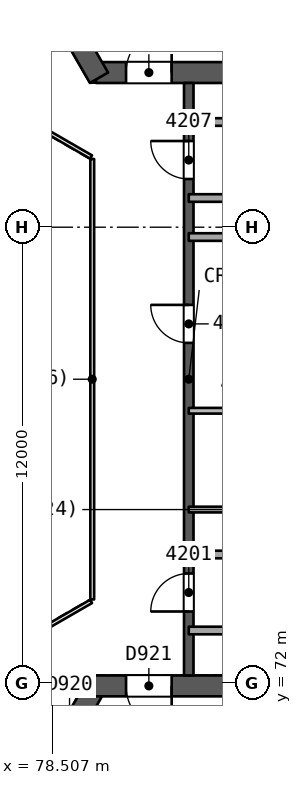
"""IFC4 building model, lengths in metres.
Left out: names, types, materials, properties, quantities, classifications, styles, units other than length and angle.
Written with IfcOpenShell. Run it as: python <this file> out.ifc"""

import sys

from ifc_helpers import new_model, si_unit, direction, frame, frame_2d, origin, place, context, subcontext, project, spatial, rectangle, extrude, element, fill, save


model = new_model("IFC4")
c1 = context("Model", 3, precision=1e-05, world=origin(), true_north=direction((0.0, 1.0)))
c2 = subcontext(c1, "Body", "Model", "MODEL_VIEW")
j1 = project(units=[si_unit("LENGTHUNIT", "METRE"), si_unit("PLANEANGLEUNIT", "RADIAN")], contexts=[c1])
p1 = place(None, origin())
s1 = spatial("IfcSite", under=j1, at=p1, CompositionType="ELEMENT")
p2 = place(p1, origin())
s2 = spatial("IfcBuilding", under=s1, at=p2, CompositionType="ELEMENT")
p3 = place(p2, frame((0.0, 0.0, 174.8)))
s3 = spatial("IfcBuildingStorey", under=s2, at=p3, CompositionType="ELEMENT", Elevation=174.8)
p4 = place(p3, frame((79.659, 88.069, 0.0), z_axis=(0.0, 0.0, 1.0), x_axis=(1.0, 0.0, 0.0)))
e1 = element("IfcWall", 1, at=p4, inside=s3, PredefinedType="SHEAR", context=c2, shape_type="SweptSolid", body=[
    extrude(rectangle(XDim=10.221, YDim=0.55, at=frame_2d((5.111, 0.0))), origin(), (0.0, 0.0, 1.0), 3.7),
])
p5 = place(p4, frame((0.791, 0.0, 0.0)))
e2 = element("IfcOpeningElement", 2, at=p5, cuts=e1, PredefinedType="OPENING", context=c2, shape_type="SweptSolid", body=[
    extrude(rectangle(XDim=1.2, YDim=2.1, at=frame_2d((0.6, 1.05))), frame((0.0, 0.286, 0.0), z_axis=(0.0, -1.0, 0.0), x_axis=(1.0, 0.0, 0.0)), (0.0, 0.0, 1.0), 0.571),
])
p6 = place(p3, frame((74.686, 96.683, 0.0), z_axis=(0.0, 0.0, 1.0), x_axis=(0.499997818338, -0.866026663364, 0.0)))
e3 = element("IfcWall", 3, at=p6, inside=s3, PredefinedType="SHEAR", context=c2, shape_type="SweptSolid", body=[
    extrude(rectangle(XDim=10.105, YDim=0.55, at=frame_2d((5.052, 0.0))), origin(), (0.0, 0.0, 1.0), 3.7),
])
p7 = place(p6, frame((7.955, 0.0, 0.0)))
e4 = element("IfcOpeningElement", 4, at=p7, cuts=e3, PredefinedType="OPENING", context=c2, shape_type="SweptSolid", body=[
    extrude(rectangle(XDim=1.2, YDim=2.1, at=frame_2d((0.6, 1.05))), frame((0.0, 0.286, 0.0), z_axis=(0.0, -1.0, 0.0), x_axis=(1.0, 0.0, 0.0)), (0.0, 0.0, 1.0), 0.571),
])
p8 = place(p3, frame((79.659, 71.931, 0.0), z_axis=(0.0, 0.0, 1.0), x_axis=(-0.500000202252, -0.866025287014, 0.0)))
e5 = element("IfcWall", 5, at=p8, inside=s3, PredefinedType="SHEAR", context=c2, shape_type="SweptSolid", body=[
    extrude(rectangle(XDim=10.221, YDim=0.55, at=frame_2d((5.111, 0.0))), origin(), (0.0, 0.0, 1.0), 3.7),
])
p9 = place(p8, frame((0.791, 0.0, 0.0)))
e6 = element("IfcOpeningElement", 6, at=p9, cuts=e5, PredefinedType="OPENING", context=c2, shape_type="SweptSolid", body=[
    extrude(rectangle(XDim=1.2, YDim=2.1, at=frame_2d((0.6, 1.05))), frame((0.0, 0.286, 0.0), z_axis=(0.0, -1.0, 0.0), x_axis=(1.0, 0.0, 0.0)), (0.0, 0.0, 1.0), 0.571),
])
p10 = place(p3, frame((89.605, 71.931, 0.0), z_axis=(0.0, 0.0, 1.0), x_axis=(-1.0, 0.0, 0.0)))
e7 = element("IfcWall", 7, at=p10, inside=s3, PredefinedType="SHEAR", context=c2, shape_type="SweptSolid", body=[
    extrude(rectangle(XDim=10.105, YDim=0.55, at=frame_2d((5.052, 0.0))), origin(), (0.0, 0.0, 1.0), 3.7),
])
p11 = place(p10, frame((7.955, 0.0, 0.0)))
e8 = element("IfcOpeningElement", 8, at=p11, cuts=e7, PredefinedType="OPENING", context=c2, shape_type="SweptSolid", body=[
    extrude(rectangle(XDim=1.2, YDim=2.1, at=frame_2d((0.6, 1.05))), frame((0.0, 0.286, 0.0), z_axis=(0.0, -1.0, 0.0), x_axis=(1.0, 0.0, 0.0)), (0.0, 0.0, 1.0), 0.571),
])
p12 = place(p3, frame((82.1, 72.206, 0.0), z_axis=(0.0, 0.0, 1.0), x_axis=(0.0, 1.0, 0.0)))
e9 = element("IfcWall", 9, at=p12, inside=s3, PredefinedType="SHEAR", context=c2, shape_type="SweptSolid", body=[
    extrude(rectangle(XDim=15.588, YDim=0.25, at=frame_2d((7.794, 0.0))), origin(), (0.0, 0.0, 1.0), 3.25),
])
p13 = place(p12, frame((1.682, 0.0, 0.0)))
e10 = element("IfcOpeningElement", 10, at=p13, cuts=e9, PredefinedType="OPENING", context=c2, shape_type="SweptSolid", body=[
    extrude(rectangle(XDim=1.0, YDim=2.1, at=frame_2d((0.5, 1.05))), frame((0.0, 0.135, 0.0), z_axis=(0.0, -1.0, 0.0), x_axis=(1.0, 0.0, 0.0)), (0.0, 0.0, 1.0), 0.271),
])
p14 = place(p12, frame((8.75, 0.0, 0.0)))
e11 = element("IfcOpeningElement", 11, at=p14, cuts=e9, PredefinedType="OPENING", context=c2, shape_type="SweptSolid", body=[
    extrude(rectangle(XDim=1.0, YDim=2.1, at=frame_2d((0.5, 1.05))), frame((0.0, 0.135, 0.0), z_axis=(0.0, -1.0, 0.0), x_axis=(1.0, 0.0, 0.0)), (0.0, 0.0, 1.0), 0.271),
])
p15 = place(p12, frame((13.062, 0.0, 0.0)))
e12 = element("IfcOpeningElement", 12, at=p15, cuts=e9, PredefinedType="OPENING", context=c2, shape_type="SweptSolid", body=[
    extrude(rectangle(XDim=1.0, YDim=2.1, at=frame_2d((0.5, 1.05))), frame((0.0, 0.135, 0.0), z_axis=(0.0, -1.0, 0.0), x_axis=(1.0, 0.0, 0.0)), (0.0, 0.0, 1.0), 0.271),
])
p16 = place(p3, frame((82.1, 75.388, 0.0), z_axis=(0.0, 0.0, 1.0), x_axis=(1.0, 0.0, 0.0)))
e13 = element("IfcWall", 13, at=p16, inside=s3, PredefinedType="PARTITIONING", context=c2, shape_type="SweptSolid", body=[
    extrude(rectangle(XDim=9.0, YDim=0.2, at=frame_2d((4.5, 0.0))), origin(), (0.0, 0.0, 1.0), 3.25),
])
p17 = place(p16, frame((4.05, 0.0, 0.0)))
e14 = element("IfcOpeningElement", 14, at=p17, cuts=e13, PredefinedType="OPENING", context=c2, shape_type="SweptSolid", body=[
    extrude(rectangle(XDim=0.9, YDim=2.1, at=frame_2d((0.45, 1.05))), frame((0.0, 0.11, 0.0), z_axis=(0.0, -1.0, 0.0), x_axis=(1.0, 0.0, 0.0)), (0.0, 0.0, 1.0), 0.221),
])
p18 = place(p3, frame((91.1, 73.388, 0.0), z_axis=(0.0, 0.0, 1.0), x_axis=(-1.0, 0.0, 0.0)))
e15 = element("IfcWall", 15, at=p18, inside=s3, PredefinedType="PARTITIONING", context=c2, shape_type="SweptSolid", body=[
    extrude(rectangle(XDim=9.0, YDim=0.2, at=frame_2d((4.5, 0.0))), origin(), (0.0, 0.0, 1.0), 3.25),
])
p19 = place(p3, frame((85.0, 76.571, 0.0), z_axis=(0.0, 0.0, 1.0), x_axis=(-1.0, 0.0, 0.0)))
e16 = element("IfcWall", 16, at=p19, inside=s3, PredefinedType="PARTITIONING", context=c2, shape_type="SweptSolid", body=[
    extrude(rectangle(XDim=2.9, YDim=0.15, at=frame_2d((1.45, 0.0))), origin(), (0.0, 0.0, 1.0), 3.25),
])
p20 = place(p3, frame((82.1, 79.171, 0.0), z_axis=(0.0, 0.0, 1.0), x_axis=(1.0, 0.0, 0.0)))
e17 = element("IfcWall", 17, at=p20, inside=s3, PredefinedType="PARTITIONING", context=c2, shape_type="SweptSolid", body=[
    extrude(rectangle(XDim=2.9, YDim=0.15, at=frame_2d((1.45, 0.0))), origin(), (0.0, 0.0, 1.0), 3.25),
])
p21 = place(p20, frame((1.05, 0.0, 0.0)))
e18 = element("IfcOpeningElement", 18, at=p21, cuts=e17, PredefinedType="OPENING", context=c2, shape_type="SweptSolid", body=[
    extrude(rectangle(XDim=0.8, YDim=2.1, at=frame_2d((0.4, 1.05))), frame((0.0, 0.085, 0.0), z_axis=(0.0, -1.0, 0.0), x_axis=(1.0, 0.0, 0.0)), (0.0, 0.0, 1.0), 0.171),
])
p22 = place(p3, frame((93.428, 83.741, 0.0), z_axis=(0.0, 0.0, 1.0), x_axis=(-1.0, 0.0, 0.0)))
e19 = element("IfcWall", 19, at=p22, inside=s3, PredefinedType="PARTITIONING", context=c2, shape_type="SweptSolid", body=[
    extrude(rectangle(XDim=11.328, YDim=0.2, at=frame_2d((5.664, 0.0))), origin(), (0.0, 0.0, 1.0), 3.25),
])
for number, where, z_axis, x_axis in (
    (20, (82.1, 86.768, 0.0), (0.0, 0.0, 1.0), (1.0, 0.0, 0.0)),
    (21, (91.1, 84.768, 0.0), (0.0, 0.0, 1.0), (-1.0, 0.0, 0.0)),
):
    element("IfcWall", number, at=place(p3, frame(where, z_axis=z_axis, x_axis=x_axis)), inside=s3, PredefinedType="PARTITIONING", context=c2, shape_type="SweptSolid", body=[
        extrude(rectangle(XDim=9.0, YDim=0.2, at=frame_2d((4.5, 0.0))), origin(), (0.0, 0.0, 1.0), 3.25),
    ])
p23 = place(p3, frame((42.58, 82.733, 0.0), z_axis=(0.0, 0.0, 1.0), x_axis=(0.866025382531, 0.500000036812, 0.0)))
e22 = element("IfcWall", 22, at=p23, inside=s3, PredefinedType="SOLIDWALL", context=c2, shape_type="SweptSolid", body=[
    extrude(rectangle(XDim=53.42, YDim=0.3, at=frame_2d((26.71, 0.0))), origin(), (0.0, 0.0, 1.0), 3.25),
])
p24 = place(p23, frame((30.499, 0.0, 0.0)))
e23 = element("IfcOpeningElement", 23, at=p24, cuts=e22, PredefinedType="OPENING", context=c2, shape_type="SweptSolid", body=[
    extrude(rectangle(XDim=2.4, YDim=2.4, at=frame_2d((1.2, 1.2))), frame((0.0, 0.161, 0.0), z_axis=(0.0, -1.0, 0.0), x_axis=(1.0, 0.0, 0.0)), (0.0, 0.0, 1.0), 0.321),
])
p25 = place(p23, frame((41.52, 0.0, 0.0)))
e24 = element("IfcOpeningElement", 24, at=p25, cuts=e22, PredefinedType="OPENING", context=c2, shape_type="SweptSolid", body=[
    extrude(rectangle(XDim=2.4, YDim=2.4, at=frame_2d((1.2, 1.2))), frame((0.0, 0.161, 0.0), z_axis=(0.0, -1.0, 0.0), x_axis=(1.0, 0.0, 0.0)), (0.0, 0.0, 1.0), 0.321),
])
p26 = place(p23, frame((19.742, 0.0, 0.0)))
e25 = element("IfcOpeningElement", 25, at=p26, cuts=e22, PredefinedType="OPENING", context=c2, shape_type="SweptSolid", body=[
    extrude(rectangle(XDim=2.4, YDim=2.4, at=frame_2d((1.2, 1.2))), frame((0.0, 0.161, 0.0), z_axis=(0.0, -1.0, 0.0), x_axis=(1.0, 0.0, 0.0)), (0.0, 0.0, 1.0), 0.321),
])
p27 = place(p23, frame((9.507, 0.0, 0.0)))
e26 = element("IfcOpeningElement", 26, at=p27, cuts=e22, PredefinedType="OPENING", context=c2, shape_type="SweptSolid", body=[
    extrude(rectangle(XDim=2.4, YDim=2.4, at=frame_2d((1.2, 1.2))), frame((0.0, 0.161, 0.0), z_axis=(0.0, -1.0, 0.0), x_axis=(1.0, 0.0, 0.0)), (0.0, 0.0, 1.0), 0.321),
])
p28 = place(p23, frame((26.512, 0.0, 0.9)))
e27 = element("IfcOpeningElement", 27, at=p28, cuts=e22, PredefinedType="OPENING", context=c2, shape_type="SweptSolid", body=[
    extrude(rectangle(XDim=1.8, YDim=1.5, at=frame_2d((0.9, 0.75))), frame((0.0, 0.161, 0.0), z_axis=(0.0, -1.0, 0.0), x_axis=(1.0, 0.0, 0.0)), (0.0, 0.0, 1.0), 0.321),
])
p29 = place(p23, frame((23.55, 0.0, 0.9)))
e28 = element("IfcOpeningElement", 28, at=p29, cuts=e22, PredefinedType="OPENING", context=c2, shape_type="SweptSolid", body=[
    extrude(rectangle(XDim=1.8, YDim=1.5, at=frame_2d((0.9, 0.75))), frame((0.0, 0.161, 0.0), z_axis=(0.0, -1.0, 0.0), x_axis=(1.0, 0.0, 0.0)), (0.0, 0.0, 1.0), 0.321),
])
p30 = place(p3, frame((88.844, 50.557, 0.0), z_axis=(0.0, 0.0, 1.0), x_axis=(-0.866025382531, 0.500000036812, 0.0)))
e29 = element("IfcWall", 29, at=p30, inside=s3, PredefinedType="SOLIDWALL", context=c2, shape_type="SweptSolid", body=[
    extrude(rectangle(XDim=53.42, YDim=0.3, at=frame_2d((26.71, 0.0))), origin(), (0.0, 0.0, 1.0), 3.25),
])
p31 = place(p30, frame((31.122, 0.0, 0.0)))
e30 = element("IfcOpeningElement", 30, at=p31, cuts=e29, PredefinedType="OPENING", context=c2, shape_type="SweptSolid", body=[
    extrude(rectangle(XDim=2.4, YDim=2.4, at=frame_2d((1.2, 1.2))), frame((0.0, 0.161, 0.0), z_axis=(0.0, -1.0, 0.0), x_axis=(1.0, 0.0, 0.0)), (0.0, 0.0, 1.0), 0.321),
])
p32 = place(p30, frame((41.52, 0.0, 0.0)))
e31 = element("IfcOpeningElement", 31, at=p32, cuts=e29, PredefinedType="OPENING", context=c2, shape_type="SweptSolid", body=[
    extrude(rectangle(XDim=2.4, YDim=2.4, at=frame_2d((1.2, 1.2))), frame((0.0, 0.161, 0.0), z_axis=(0.0, -1.0, 0.0), x_axis=(1.0, 0.0, 0.0)), (0.0, 0.0, 1.0), 0.321),
])
p33 = place(p30, frame((20.834, 0.0, 0.0)))
e32 = element("IfcOpeningElement", 32, at=p33, cuts=e29, PredefinedType="OPENING", context=c2, shape_type="SweptSolid", body=[
    extrude(rectangle(XDim=2.4, YDim=2.4, at=frame_2d((1.2, 1.2))), frame((0.0, 0.161, 0.0), z_axis=(0.0, -1.0, 0.0), x_axis=(1.0, 0.0, 0.0)), (0.0, 0.0, 1.0), 0.321),
])
p34 = place(p30, frame((9.507, 0.0, 0.0)))
e33 = element("IfcOpeningElement", 33, at=p34, cuts=e29, PredefinedType="OPENING", context=c2, shape_type="SweptSolid", body=[
    extrude(rectangle(XDim=2.4, YDim=2.4, at=frame_2d((1.2, 1.2))), frame((0.0, 0.161, 0.0), z_axis=(0.0, -1.0, 0.0), x_axis=(1.0, 0.0, 0.0)), (0.0, 0.0, 1.0), 0.321),
])
p35 = place(p30, frame((26.446, 0.0, 0.0)))
e34 = element("IfcOpeningElement", 34, at=p35, cuts=e29, PredefinedType="OPENING", context=c2, shape_type="SweptSolid", body=[
    extrude(rectangle(XDim=2.4, YDim=2.4, at=frame_2d((1.2, 1.2))), frame((0.0, 0.161, 0.0), z_axis=(0.0, -1.0, 0.0), x_axis=(1.0, 0.0, 0.0)), (0.0, 0.0, 1.0), 0.321),
])
p36 = place(p3, frame((79.56, 74.206, 0.0), z_axis=(0.0, 0.0, 1.0), x_axis=(0.0, 1.0, 0.0)))
e35 = element("IfcWall", 35, at=p36, inside=s3, PredefinedType="PARTITIONING", context=c2, shape_type="SweptSolid", body=[
    extrude(rectangle(XDim=11.588, YDim=0.1, at=frame_2d((5.794, 0.0))), origin(), (0.0, 0.0, 1.0), 3.25),
])
for number, where, z_axis, x_axis in (
    (36, (79.53, 85.846, 0.0), (0.0, 0.0, 1.0), (-0.866, 0.5, 0.0)),
    (37, (77.798, 73.154, 0.0), (0.0, 0.0, 1.0), (0.866, 0.5, 0.0)),
):
    element("IfcWall", number, at=place(p3, frame(where, z_axis=z_axis, x_axis=x_axis)), inside=s3, PredefinedType="PARTITIONING", context=c2, shape_type="SweptSolid", body=[
        extrude(rectangle(XDim=2.0, YDim=0.1, at=frame_2d((1.0, 0.0))), origin(), (0.0, 0.0, 1.0), 3.25),
    ])
p37 = place(p13, origin())
e38 = element("IfcDoor", 38, at=p37, inside=s3, OperationType="SINGLE_SWING_LEFT", PredefinedType="NOTDEFINED", context=c2, shape_type="SweptSolid", body=[
    extrude(rectangle(XDim=1.0, YDim=2.1, at=frame_2d((0.5, 1.05))), frame((0.0, 0.025, 0.0), z_axis=(0.0, -1.0, 0.0), x_axis=(1.0, 0.0, 0.0)), (0.0, 0.0, 1.0), 0.05),
])
fill(e10, e38)
p38 = place(p14, origin())
e39 = element("IfcDoor", 39, at=p38, inside=s3, OperationType="SINGLE_SWING_RIGHT", PredefinedType="NOTDEFINED", context=c2, shape_type="SweptSolid", body=[
    extrude(rectangle(XDim=1.0, YDim=2.1, at=frame_2d((0.5, 1.05))), frame((0.0, 0.025, 0.0), z_axis=(0.0, -1.0, 0.0), x_axis=(1.0, 0.0, 0.0)), (0.0, 0.0, 1.0), 0.05),
])
fill(e11, e39)
p39 = place(p15, origin())
e40 = element("IfcDoor", 40, at=p39, inside=s3, OperationType="SINGLE_SWING_RIGHT", PredefinedType="NOTDEFINED", context=c2, shape_type="SweptSolid", body=[
    extrude(rectangle(XDim=1.0, YDim=2.1, at=frame_2d((0.5, 1.05))), frame((0.0, 0.025, 0.0), z_axis=(0.0, -1.0, 0.0), x_axis=(1.0, 0.0, 0.0)), (0.0, 0.0, 1.0), 0.05),
])
fill(e12, e40)
p40 = place(p5, origin())
e41 = element("IfcDoor", 41, at=p40, inside=s3, OperationType="SINGLE_SWING_RIGHT", PredefinedType="NOTDEFINED", context=c2, shape_type="SweptSolid", body=[
    extrude(rectangle(XDim=1.2, YDim=2.1, at=frame_2d((0.6, 1.05))), frame((0.0, 0.025, 0.0), z_axis=(0.0, -1.0, 0.0), x_axis=(1.0, 0.0, 0.0)), (0.0, 0.0, 1.0), 0.05),
])
fill(e2, e41)
p41 = place(p11, origin())
e42 = element("IfcDoor", 42, at=p41, inside=s3, OperationType="SINGLE_SWING_LEFT", PredefinedType="NOTDEFINED", context=c2, shape_type="SweptSolid", body=[
    extrude(rectangle(XDim=1.2, YDim=2.1, at=frame_2d((0.6, 1.05))), frame((0.0, 0.025, 0.0), z_axis=(0.0, -1.0, 0.0), x_axis=(1.0, 0.0, 0.0)), (0.0, 0.0, 1.0), 0.05),
])
fill(e8, e42)
save(model, sys.argv[1])
